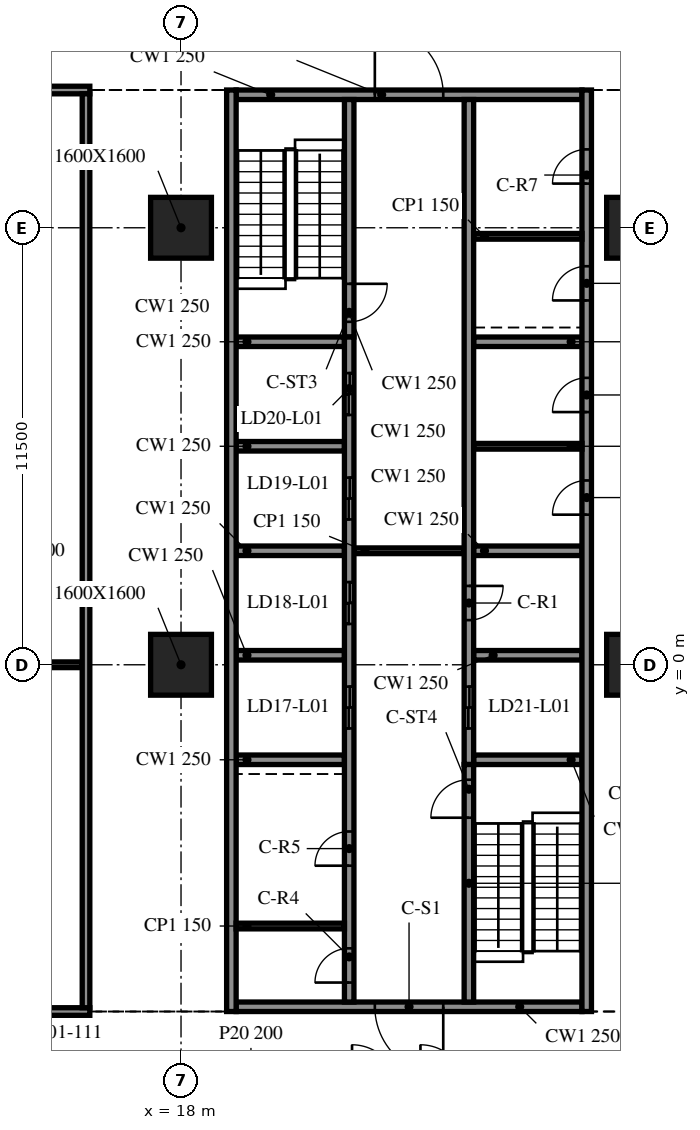
"""IFC4 building model, lengths in metres.
Left out: names, types, materials, properties, quantities, classifications, styles, units other than length and angle.
Written with IfcOpenShell. Run it as: python <this file> out.ifc"""

import sys

from ifc_helpers import new_model, si_unit, direction, frame, frame_2d, origin, origin_2d, place, context, subcontext, project, spatial, rectangle, extrude, element, fill, save


model = new_model("IFC4")
c1 = context("Model", 3, precision=1e-05, world=origin(), true_north=direction((0.0, 1.0)))
c2 = subcontext(c1, "Body", "Model", "MODEL_VIEW")
j1 = project(units=[si_unit("LENGTHUNIT", "METRE"), si_unit("PLANEANGLEUNIT", "RADIAN")], contexts=[c1])
p1 = place(None, origin())
s1 = spatial("IfcSite", under=j1, at=p1, CompositionType="ELEMENT")
p2 = place(p1, origin())
s2 = spatial("IfcBuilding", under=s1, at=p2, CompositionType="ELEMENT")
p3 = place(p2, frame((0.0, 0.0, 7.2)))
s3 = spatial("IfcBuildingStorey", under=s2, at=p3, CompositionType="ELEMENT", Elevation=7.2)
for number, where, z_axis, x_axis in (
    (1, (18.0, 0.0, -0.34), (0.0, 0.0, 1.0), (1.0, 0.0, 0.0)),
    (2, (18.0, 11.5, -0.34), (0.0, 0.0, 1.0), (1.0, 0.0, 0.0)),
    (3, (30.0, 0.0, -0.34), (0.0, 0.0, 1.0), (1.0, 0.0, 0.0)),
    (4, (30.0, 11.5, -0.34), (0.0, 0.0, 1.0), (1.0, 0.0, 0.0)),
):
    element("IfcColumn", number, at=place(p3, frame(where, z_axis=z_axis, x_axis=x_axis)), inside=s3, PredefinedType="COLUMN", context=c2, shape_type="SweptSolid", body=[
        extrude(rectangle(XDim=1.6, YDim=1.6, at=origin_2d()), origin(), (0.0, 0.0, 1.0), 4.3),
    ])
p4 = place(p3, frame((19.325, 15.125, 0.0), z_axis=(0.0, 0.0, 1.0), x_axis=(0.0, -1.0, 0.0)))
e5 = element("IfcWall", 5, at=p4, inside=s3, PredefinedType="SOLIDWALL", context=c2, shape_type="SweptSolid", body=[
    extrude(rectangle(XDim=24.25, YDim=0.25, at=frame_2d((12.125, 0.0))), origin(), (0.0, 0.0, 1.0), 3.96),
])
p5 = place(p3, frame((28.675, -9.125, 0.0), z_axis=(0.0, 0.0, 1.0), x_axis=(0.0, 1.0, 0.0)))
e6 = element("IfcWall", 6, at=p5, inside=s3, PredefinedType="SOLIDWALL", context=c2, shape_type="SweptSolid", body=[
    extrude(rectangle(XDim=24.25, YDim=0.25, at=frame_2d((12.125, 0.0))), origin(), (0.0, 0.0, 1.0), 3.96),
])
p6 = place(p5, frame((13.075, 0.0, 0.0)))
e7 = element("IfcOpeningElement", 7, at=p6, cuts=e6, PredefinedType="OPENING", context=c2, shape_type="SweptSolid", body=[
    extrude(rectangle(XDim=0.9, YDim=2.1, at=frame_2d((0.45, 1.05))), frame((0.0, 0.135, 0.0), z_axis=(0.0, -1.0, 0.0), x_axis=(1.0, 0.0, 0.0)), (0.0, 0.0, 1.0), 0.27),
])
p7 = place(p5, frame((15.775, 0.0, 0.0)))
e8 = element("IfcOpeningElement", 8, at=p7, cuts=e6, PredefinedType="OPENING", context=c2, shape_type="SweptSolid", body=[
    extrude(rectangle(XDim=0.9, YDim=2.1, at=frame_2d((0.45, 1.05))), frame((0.0, 0.135, 0.0), z_axis=(0.0, -1.0, 0.0), x_axis=(1.0, 0.0, 0.0)), (0.0, 0.0, 1.0), 0.27),
])
p8 = place(p5, frame((18.712, 0.0, 0.0)))
e9 = element("IfcOpeningElement", 9, at=p8, cuts=e6, PredefinedType="OPENING", context=c2, shape_type="SweptSolid", body=[
    extrude(rectangle(XDim=0.9, YDim=2.1, at=frame_2d((0.45, 1.05))), frame((0.0, 0.135, 0.0), z_axis=(0.0, -1.0, 0.0), x_axis=(1.0, 0.0, 0.0)), (0.0, 0.0, 1.0), 0.27),
])
p9 = place(p5, frame((21.788, 0.0, 0.0)))
e10 = element("IfcOpeningElement", 10, at=p9, cuts=e6, PredefinedType="OPENING", context=c2, shape_type="SweptSolid", body=[
    extrude(rectangle(XDim=0.9, YDim=2.1, at=frame_2d((0.45, 1.05))), frame((0.0, 0.135, 0.0), z_axis=(0.0, -1.0, 0.0), x_axis=(1.0, 0.0, 0.0)), (0.0, 0.0, 1.0), 0.27),
])
p10 = place(p3, frame((28.55, -9.0, 0.0), z_axis=(0.0, 0.0, 1.0), x_axis=(-1.0, 0.0, 0.0)))
e11 = element("IfcWall", 11, at=p10, inside=s3, PredefinedType="SOLIDWALL", context=c2, shape_type="SweptSolid", body=[
    extrude(rectangle(XDim=9.1, YDim=0.25, at=frame_2d((4.55, 0.0))), origin(), (0.0, 0.0, 1.0), 3.96),
])
p11 = place(p10, frame((3.65, 0.0, 0.0)))
e12 = element("IfcOpeningElement", 12, at=p11, cuts=e11, PredefinedType="OPENING", context=c2, shape_type="SweptSolid", body=[
    extrude(rectangle(XDim=1.8, YDim=2.1, at=frame_2d((0.9, 1.05))), frame((0.0, 0.135, 0.0), z_axis=(0.0, -1.0, 0.0), x_axis=(1.0, 0.0, 0.0)), (0.0, 0.0, 1.0), 0.27),
])
p12 = place(p3, frame((19.45, 15.0, 0.0), z_axis=(0.0, 0.0, 1.0), x_axis=(1.0, 0.0, 0.0)))
e13 = element("IfcWall", 13, at=p12, inside=s3, PredefinedType="SOLIDWALL", context=c2, shape_type="SweptSolid", body=[
    extrude(rectangle(XDim=9.1, YDim=0.25, at=frame_2d((4.55, 0.0))), origin(), (0.0, 0.0, 1.0), 3.96),
])
p13 = place(p12, frame((3.65, 0.0, 0.0)))
e14 = element("IfcOpeningElement", 14, at=p13, cuts=e13, PredefinedType="OPENING", context=c2, shape_type="SweptSolid", body=[
    extrude(rectangle(XDim=1.8, YDim=2.1, at=frame_2d((0.9, 1.05))), frame((0.0, 0.135, 0.0), z_axis=(0.0, -1.0, 0.0), x_axis=(1.0, 0.0, 0.0)), (0.0, 0.0, 1.0), 0.27),
])
p14 = place(p3, frame((22.425, -8.875, 0.0), z_axis=(0.0, 0.0, 1.0), x_axis=(0.0, 1.0, 0.0)))
e15 = element("IfcWall", 15, at=p14, inside=s3, PredefinedType="SOLIDWALL", context=c2, shape_type="SweptSolid", body=[
    extrude(rectangle(XDim=17.5, YDim=0.25, at=frame_2d((8.75, 0.0))), origin(), (0.0, 0.0, 1.0), 3.96),
])
p15 = place(p14, frame((7.2, 0.0, 0.0)))
e16 = element("IfcOpeningElement", 16, at=p15, cuts=e15, PredefinedType="OPENING", context=c2, shape_type="SweptSolid", body=[
    extrude(rectangle(XDim=1.1, YDim=2.1, at=frame_2d((0.55, 1.05))), frame((0.0, 0.135, 0.0), z_axis=(0.0, -1.0, 0.0), x_axis=(1.0, 0.0, 0.0)), (0.0, 0.0, 1.0), 0.27),
])
p16 = place(p14, frame((9.95, 0.0, 0.0)))
e17 = element("IfcOpeningElement", 17, at=p16, cuts=e15, PredefinedType="OPENING", context=c2, shape_type="SweptSolid", body=[
    extrude(rectangle(XDim=1.1, YDim=2.1, at=frame_2d((0.55, 1.05))), frame((0.0, 0.135, 0.0), z_axis=(0.0, -1.0, 0.0), x_axis=(1.0, 0.0, 0.0)), (0.0, 0.0, 1.0), 0.27),
])
p17 = place(p14, frame((12.7, 0.0, 0.0)))
e18 = element("IfcOpeningElement", 18, at=p17, cuts=e15, PredefinedType="OPENING", context=c2, shape_type="SweptSolid", body=[
    extrude(rectangle(XDim=1.1, YDim=2.1, at=frame_2d((0.55, 1.05))), frame((0.0, 0.135, 0.0), z_axis=(0.0, -1.0, 0.0), x_axis=(1.0, 0.0, 0.0)), (0.0, 0.0, 1.0), 0.27),
])
p18 = place(p14, frame((15.45, 0.0, 0.0)))
e19 = element("IfcOpeningElement", 19, at=p18, cuts=e15, PredefinedType="OPENING", context=c2, shape_type="SweptSolid", body=[
    extrude(rectangle(XDim=1.1, YDim=2.1, at=frame_2d((0.55, 1.05))), frame((0.0, 0.135, 0.0), z_axis=(0.0, -1.0, 0.0), x_axis=(1.0, 0.0, 0.0)), (0.0, 0.0, 1.0), 0.27),
])
p19 = place(p14, frame((0.512, 0.0, 0.0)))
e20 = element("IfcOpeningElement", 20, at=p19, cuts=e15, PredefinedType="OPENING", context=c2, shape_type="SweptSolid", body=[
    extrude(rectangle(XDim=0.9, YDim=2.1, at=frame_2d((0.45, 1.05))), frame((0.0, 0.135, 0.0), z_axis=(0.0, -1.0, 0.0), x_axis=(1.0, 0.0, 0.0)), (0.0, 0.0, 1.0), 0.27),
])
p20 = place(p14, frame((3.587, 0.0, 0.0)))
e21 = element("IfcOpeningElement", 21, at=p20, cuts=e15, PredefinedType="OPENING", context=c2, shape_type="SweptSolid", body=[
    extrude(rectangle(XDim=0.9, YDim=2.1, at=frame_2d((0.45, 1.05))), frame((0.0, 0.135, 0.0), z_axis=(0.0, -1.0, 0.0), x_axis=(1.0, 0.0, 0.0)), (0.0, 0.0, 1.0), 0.27),
])
p21 = place(p3, frame((22.425, 14.875, 0.0), z_axis=(0.0, 0.0, 1.0), x_axis=(0.0, -1.0, 0.0)))
e22 = element("IfcWall", 22, at=p21, inside=s3, PredefinedType="SOLIDWALL", context=c2, shape_type="SweptSolid", body=[
    extrude(rectangle(XDim=6.25, YDim=0.25, at=frame_2d((3.125, 0.0))), origin(), (0.0, 0.0, 1.0), 3.96),
])
p22 = place(p21, frame((4.85, 0.0, 0.0)))
e23 = element("IfcOpeningElement", 23, at=p22, cuts=e22, PredefinedType="OPENING", context=c2, shape_type="SweptSolid", body=[
    extrude(rectangle(XDim=1.0, YDim=2.1, at=frame_2d((0.5, 1.05))), frame((0.0, 0.135, 0.0), z_axis=(0.0, -1.0, 0.0), x_axis=(1.0, 0.0, 0.0)), (0.0, 0.0, 1.0), 0.27),
])
p23 = place(p3, frame((25.575, -8.875, 0.0), z_axis=(0.0, 0.0, 1.0), x_axis=(0.0, 1.0, 0.0)))
e24 = element("IfcWall", 24, at=p23, inside=s3, PredefinedType="SOLIDWALL", context=c2, shape_type="SweptSolid", body=[
    extrude(rectangle(XDim=6.25, YDim=0.25, at=frame_2d((3.125, 0.0))), origin(), (0.0, 0.0, 1.0), 3.96),
])
p24 = place(p23, frame((4.85, 0.0, 0.0)))
e25 = element("IfcOpeningElement", 25, at=p24, cuts=e24, PredefinedType="OPENING", context=c2, shape_type="SweptSolid", body=[
    extrude(rectangle(XDim=1.0, YDim=2.1, at=frame_2d((0.5, 1.05))), frame((0.0, 0.135, 0.0), z_axis=(0.0, -1.0, 0.0), x_axis=(1.0, 0.0, 0.0)), (0.0, 0.0, 1.0), 0.27),
])
p25 = place(p3, frame((25.575, 14.875, 0.0), z_axis=(0.0, 0.0, 1.0), x_axis=(0.0, -1.0, 0.0)))
e26 = element("IfcWall", 26, at=p25, inside=s3, PredefinedType="SOLIDWALL", context=c2, shape_type="SweptSolid", body=[
    extrude(rectangle(XDim=17.5, YDim=0.25, at=frame_2d((8.75, 0.0))), origin(), (0.0, 0.0, 1.0), 3.96),
])
p26 = place(p25, frame((15.45, 0.0, 0.0)))
e27 = element("IfcOpeningElement", 27, at=p26, cuts=e26, PredefinedType="OPENING", context=c2, shape_type="SweptSolid", body=[
    extrude(rectangle(XDim=1.1, YDim=2.1, at=frame_2d((0.55, 1.05))), frame((0.0, 0.135, 0.0), z_axis=(0.0, -1.0, 0.0), x_axis=(1.0, 0.0, 0.0)), (0.0, 0.0, 1.0), 0.27),
])
p27 = place(p25, frame((12.8, 0.0, 0.0)))
e28 = element("IfcOpeningElement", 28, at=p27, cuts=e26, PredefinedType="OPENING", context=c2, shape_type="SweptSolid", body=[
    extrude(rectangle(XDim=0.9, YDim=2.1, at=frame_2d((0.45, 1.05))), frame((0.0, 0.135, 0.0), z_axis=(0.0, -1.0, 0.0), x_axis=(1.0, 0.0, 0.0)), (0.0, 0.0, 1.0), 0.27),
])
for number, where, z_axis, x_axis in (
    (29, (19.45, -2.5, 0.0), (0.0, 0.0, 1.0), (1.0, 0.0, 0.0)),
    (30, (19.45, 0.25, 0.0), (0.0, 0.0, 1.0), (1.0, 0.0, 0.0)),
    (31, (19.45, 3.0, 0.0), (0.0, 0.0, 1.0), (1.0, 0.0, 0.0)),
    (32, (19.45, 5.75, 0.0), (0.0, 0.0, 1.0), (1.0, 0.0, 0.0)),
    (33, (19.45, 8.5, 0.0), (0.0, 0.0, 1.0), (1.0, 0.0, 0.0)),
    (34, (25.7, -2.5, 0.0), (0.0, 0.0, 1.0), (1.0, 0.0, 0.0)),
    (35, (25.7, 0.25, 0.0), (0.0, 0.0, 1.0), (1.0, 0.0, 0.0)),
    (36, (25.7, 3.0, 0.0), (0.0, 0.0, 1.0), (1.0, 0.0, 0.0)),
    (37, (25.7, 8.5, 0.0), (0.0, 0.0, 1.0), (1.0, 0.0, 0.0)),
):
    element("IfcWall", number, at=place(p3, frame(where, z_axis=z_axis, x_axis=x_axis)), inside=s3, PredefinedType="SOLIDWALL", context=c2, shape_type="SweptSolid", body=[
        extrude(rectangle(XDim=2.85, YDim=0.25, at=frame_2d((1.425, 0.0))), origin(), (0.0, 0.0, 1.0), 3.96),
    ])
p28 = place(p3, frame((22.55, 3.0, 0.0), z_axis=(0.0, 0.0, 1.0), x_axis=(1.0, 0.0, 0.0)))
e38 = element("IfcWall", 38, at=p28, inside=s3, PredefinedType="PARTITIONING", context=c2, shape_type="SweptSolid", body=[
    extrude(rectangle(XDim=2.9, YDim=0.15, at=frame_2d((1.45, 0.0))), origin(), (0.0, 0.0, 1.0), 3.96),
])
for number, where, z_axis, x_axis in (
    (39, (25.7, 5.75, 0.0), (0.0, 0.0, 1.0), (1.0, 0.0, 0.0)),
    (40, (19.45, -6.875, 0.0), (0.0, 0.0, 1.0), (1.0, 0.0, 0.0)),
    (41, (25.7, 11.275, 0.0), (0.0, 0.0, 1.0), (1.0, 0.0, 0.0)),
):
    element("IfcWall", number, at=place(p3, frame(where, z_axis=z_axis, x_axis=x_axis)), inside=s3, PredefinedType="PARTITIONING", context=c2, shape_type="SweptSolid", body=[
        extrude(rectangle(XDim=2.85, YDim=0.15, at=frame_2d((1.425, 0.0))), origin(), (0.0, 0.0, 1.0), 3.96),
    ])
p29 = place(p3, frame((8.3, -9.125, 0.0), z_axis=(0.0, 0.0, 1.0), x_axis=(1.0, 0.0, 0.0)))
e42 = element("IfcWall", 42, at=p29, inside=s3, PredefinedType="PARTITIONING", context=c2, shape_type="SweptSolid", body=[
    extrude(rectangle(XDim=7.3, YDim=0.2, at=frame_2d((3.65, 0.0))), origin(), (0.0, 0.0, 1.0), 3.96),
])
p30 = place(p29, frame((3.1, 0.0, 0.0)))
e43 = element("IfcOpeningElement", 43, at=p30, cuts=e42, PredefinedType="OPENING", context=c2, shape_type="SweptSolid", body=[
    extrude(rectangle(XDim=0.9, YDim=2.1, at=frame_2d((0.45, 1.05))), frame((0.0, 0.11, 0.0), z_axis=(0.0, -1.0, 0.0), x_axis=(1.0, 0.0, 0.0)), (0.0, 0.0, 1.0), 0.22),
])
p31 = place(p3, frame((8.5, 0.0, 0.0), z_axis=(0.0, 0.0, 1.0), x_axis=(1.0, 0.0, 0.0)))
e44 = element("IfcWall", 44, at=p31, inside=s3, PredefinedType="PARTITIONING", context=c2, shape_type="SweptSolid", body=[
    extrude(rectangle(XDim=6.9, YDim=0.15, at=frame_2d((3.45, 0.0))), origin(), (0.0, 0.0, 1.0), 3.96),
])
p32 = place(p3, frame((8.3, 15.125, 0.0), z_axis=(0.0, 0.0, 1.0), x_axis=(1.0, 0.0, 0.0)))
e45 = element("IfcWall", 45, at=p32, inside=s3, PredefinedType="PARTITIONING", context=c2, shape_type="SweptSolid", body=[
    extrude(rectangle(XDim=7.3, YDim=0.2, at=frame_2d((3.65, 0.0))), origin(), (0.0, 0.0, 1.0), 3.96),
])
p33 = place(p3, frame((15.5, -9.025, 0.0), z_axis=(0.0, 0.0, 1.0), x_axis=(0.0, 1.0, 0.0)))
e46 = element("IfcWall", 46, at=p33, inside=s3, PredefinedType="PARTITIONING", context=c2, shape_type="SweptSolid", body=[
    extrude(rectangle(XDim=24.05, YDim=0.2, at=frame_2d((12.025, 0.0))), origin(), (0.0, 0.0, 1.0), 3.96),
])
p34 = place(p11, origin())
e47 = element("IfcDoor", 47, at=p34, inside=s3, OperationType="DOUBLE_DOOR_SINGLE_SWING", PredefinedType="DOOR", context=c2, shape_type="SweptSolid", body=[
    extrude(rectangle(XDim=1.8, YDim=2.1, at=frame_2d((0.9, 1.05))), frame((0.0, 0.025, 0.0), z_axis=(0.0, -1.0, 0.0), x_axis=(1.0, 0.0, 0.0)), (0.0, 0.0, 1.0), 0.05),
])
fill(e12, e47)
p35 = place(p13, origin())
e48 = element("IfcDoor", 48, at=p35, inside=s3, OperationType="DOUBLE_DOOR_SINGLE_SWING", PredefinedType="DOOR", context=c2, shape_type="SweptSolid", body=[
    extrude(rectangle(XDim=1.8, YDim=2.1, at=frame_2d((0.9, 1.05))), frame((0.0, 0.025, 0.0), z_axis=(0.0, -1.0, 0.0), x_axis=(1.0, 0.0, 0.0)), (0.0, 0.0, 1.0), 0.05),
])
fill(e14, e48)
p36 = place(p26, origin())
e49 = element("IfcDoor", 49, at=p36, inside=s3, OperationType="DOUBLE_DOOR_SLIDING", PredefinedType="DOOR", context=c2, shape_type="SweptSolid", body=[
    extrude(rectangle(XDim=1.1, YDim=2.1, at=frame_2d((0.55, 1.05))), frame((0.0, 0.025, 0.0), z_axis=(0.0, -1.0, 0.0), x_axis=(1.0, 0.0, 0.0)), (0.0, 0.0, 1.0), 0.05),
])
fill(e27, e49)
p37 = place(p15, origin())
e50 = element("IfcDoor", 50, at=p37, inside=s3, OperationType="DOUBLE_DOOR_SLIDING", PredefinedType="DOOR", context=c2, shape_type="SweptSolid", body=[
    extrude(rectangle(XDim=1.1, YDim=2.1, at=frame_2d((0.55, 1.05))), frame((0.0, 0.025, 0.0), z_axis=(0.0, -1.0, 0.0), x_axis=(1.0, 0.0, 0.0)), (0.0, 0.0, 1.0), 0.05),
])
fill(e16, e50)
p38 = place(p16, origin())
e51 = element("IfcDoor", 51, at=p38, inside=s3, OperationType="DOUBLE_DOOR_SLIDING", PredefinedType="DOOR", context=c2, shape_type="SweptSolid", body=[
    extrude(rectangle(XDim=1.1, YDim=2.1, at=frame_2d((0.55, 1.05))), frame((0.0, 0.025, 0.0), z_axis=(0.0, -1.0, 0.0), x_axis=(1.0, 0.0, 0.0)), (0.0, 0.0, 1.0), 0.05),
])
fill(e17, e51)
p39 = place(p17, origin())
e52 = element("IfcDoor", 52, at=p39, inside=s3, OperationType="DOUBLE_DOOR_SLIDING", PredefinedType="DOOR", context=c2, shape_type="SweptSolid", body=[
    extrude(rectangle(XDim=1.1, YDim=2.1, at=frame_2d((0.55, 1.05))), frame((0.0, 0.025, 0.0), z_axis=(0.0, -1.0, 0.0), x_axis=(1.0, 0.0, 0.0)), (0.0, 0.0, 1.0), 0.05),
])
fill(e18, e52)
p40 = place(p18, origin())
e53 = element("IfcDoor", 53, at=p40, inside=s3, OperationType="DOUBLE_DOOR_SLIDING", PredefinedType="DOOR", context=c2, shape_type="SweptSolid", body=[
    extrude(rectangle(XDim=1.1, YDim=2.1, at=frame_2d((0.55, 1.05))), frame((0.0, 0.025, 0.0), z_axis=(0.0, -1.0, 0.0), x_axis=(1.0, 0.0, 0.0)), (0.0, 0.0, 1.0), 0.05),
])
fill(e19, e53)
p41 = place(p27, origin())
e54 = element("IfcDoor", 54, at=p41, inside=s3, OperationType="SINGLE_SWING_LEFT", PredefinedType="DOOR", context=c2, shape_type="SweptSolid", body=[
    extrude(rectangle(XDim=0.9, YDim=2.1, at=frame_2d((0.45, 1.05))), frame((0.0, 0.025, 0.0), z_axis=(0.0, -1.0, 0.0), x_axis=(1.0, 0.0, 0.0)), (0.0, 0.0, 1.0), 0.05),
])
fill(e28, e54)
p42 = place(p6, origin())
e55 = element("IfcDoor", 55, at=p42, inside=s3, OperationType="SINGLE_SWING_RIGHT", PredefinedType="DOOR", context=c2, shape_type="SweptSolid", body=[
    extrude(rectangle(XDim=0.9, YDim=2.1, at=frame_2d((0.45, 1.05))), frame((0.0, 0.025, 0.0), z_axis=(0.0, -1.0, 0.0), x_axis=(1.0, 0.0, 0.0)), (0.0, 0.0, 1.0), 0.05),
])
fill(e7, e55)
p43 = place(p7, origin())
e56 = element("IfcDoor", 56, at=p43, inside=s3, OperationType="SINGLE_SWING_LEFT", PredefinedType="DOOR", context=c2, shape_type="SweptSolid", body=[
    extrude(rectangle(XDim=0.9, YDim=2.1, at=frame_2d((0.45, 1.05))), frame((0.0, 0.025, 0.0), z_axis=(0.0, -1.0, 0.0), x_axis=(1.0, 0.0, 0.0)), (0.0, 0.0, 1.0), 0.05),
])
fill(e8, e56)
p44 = place(p19, origin())
e57 = element("IfcDoor", 57, at=p44, inside=s3, OperationType="SINGLE_SWING_RIGHT", PredefinedType="DOOR", context=c2, shape_type="SweptSolid", body=[
    extrude(rectangle(XDim=0.9, YDim=2.1, at=frame_2d((0.45, 1.05))), frame((0.0, 0.025, 0.0), z_axis=(0.0, -1.0, 0.0), x_axis=(1.0, 0.0, 0.0)), (0.0, 0.0, 1.0), 0.05),
])
fill(e20, e57)
p45 = place(p20, origin())
e58 = element("IfcDoor", 58, at=p45, inside=s3, OperationType="SINGLE_SWING_LEFT", PredefinedType="DOOR", context=c2, shape_type="SweptSolid", body=[
    extrude(rectangle(XDim=0.9, YDim=2.1, at=frame_2d((0.45, 1.05))), frame((0.0, 0.025, 0.0), z_axis=(0.0, -1.0, 0.0), x_axis=(1.0, 0.0, 0.0)), (0.0, 0.0, 1.0), 0.05),
])
fill(e21, e58)
p46 = place(p8, origin())
e59 = element("IfcDoor", 59, at=p46, inside=s3, OperationType="SINGLE_SWING_RIGHT", PredefinedType="DOOR", context=c2, shape_type="SweptSolid", body=[
    extrude(rectangle(XDim=0.9, YDim=2.1, at=frame_2d((0.45, 1.05))), frame((0.0, 0.025, 0.0), z_axis=(0.0, -1.0, 0.0), x_axis=(1.0, 0.0, 0.0)), (0.0, 0.0, 1.0), 0.05),
])
fill(e9, e59)
p47 = place(p9, origin())
e60 = element("IfcDoor", 60, at=p47, inside=s3, OperationType="SINGLE_SWING_LEFT", PredefinedType="DOOR", context=c2, shape_type="SweptSolid", body=[
    extrude(rectangle(XDim=0.9, YDim=2.1, at=frame_2d((0.45, 1.05))), frame((0.0, 0.025, 0.0), z_axis=(0.0, -1.0, 0.0), x_axis=(1.0, 0.0, 0.0)), (0.0, 0.0, 1.0), 0.05),
])
fill(e10, e60)
p48 = place(p22, origin())
e61 = element("IfcDoor", 61, at=p48, inside=s3, OperationType="SINGLE_SWING_RIGHT", PredefinedType="DOOR", context=c2, shape_type="SweptSolid", body=[
    extrude(rectangle(XDim=1.0, YDim=2.1, at=frame_2d((0.5, 1.05))), frame((0.0, 0.025, 0.0), z_axis=(0.0, -1.0, 0.0), x_axis=(1.0, 0.0, 0.0)), (0.0, 0.0, 1.0), 0.05),
])
fill(e23, e61)
p49 = place(p24, origin())
e62 = element("IfcDoor", 62, at=p49, inside=s3, OperationType="SINGLE_SWING_LEFT", PredefinedType="DOOR", context=c2, shape_type="SweptSolid", body=[
    extrude(rectangle(XDim=1.0, YDim=2.1, at=frame_2d((0.5, 1.05))), frame((0.0, 0.025, 0.0), z_axis=(0.0, -1.0, 0.0), x_axis=(1.0, 0.0, 0.0)), (0.0, 0.0, 1.0), 0.05),
])
fill(e25, e62)
save(model, sys.argv[1])
